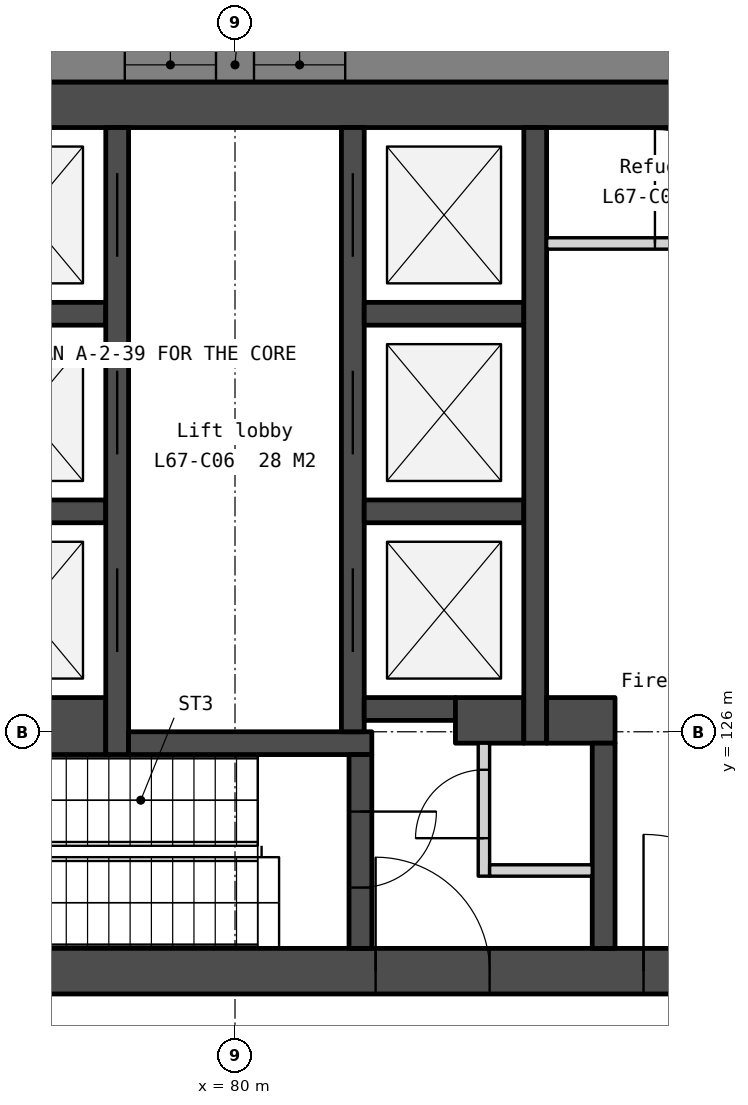
"""IFC4 building model, lengths in metres.
Left out: names, types, materials, properties, quantities, classifications, styles, units other than length and angle.
Written with IfcOpenShell. Run it as: python <this file> out.ifc"""

import sys

from ifc_helpers import new_model, si_unit, direction, frame, frame_2d, origin, place, context, subcontext, project, spatial, polyline, rectangle, outline, extrude, element, fill, save


model = new_model("IFC4")
c1 = context("Model", 3, precision=1e-05, world=origin(), true_north=direction((0.0, 1.0)))
c2 = subcontext(c1, "Body", "Model", "MODEL_VIEW")
j1 = project(units=[si_unit("LENGTHUNIT", "METRE"), si_unit("PLANEANGLEUNIT", "RADIAN")], contexts=[c1])
p1 = place(None, origin())
s1 = spatial("IfcSite", under=j1, at=p1, CompositionType="ELEMENT")
p2 = place(p1, origin())
s2 = spatial("IfcBuilding", under=s1, at=p2, CompositionType="ELEMENT")
p3 = place(p2, frame((0.0, 0.0, 273.8)))
s3 = spatial("IfcBuildingStorey", under=s2, at=p3, CompositionType="ELEMENT", Elevation=273.8)
p4 = place(p3, frame((69.0, 134.25, 0.0), z_axis=(0.0, 0.0, 1.0), x_axis=(1.0, 0.0, 0.0)))
e1 = element("IfcWall", 1, at=p4, inside=s3, PredefinedType="SOLIDWALL", context=c2, shape_type="SweptSolid", body=[
    extrude(rectangle(XDim=22.0, YDim=0.6, at=frame_2d((11.0, 0.0))), origin(), (0.0, 0.0, 1.0), 3.75),
])
p5 = place(p3, frame((69.0, 122.85, 0.0), z_axis=(0.0, 0.0, 1.0), x_axis=(1.0, 0.0, 0.0)))
e2 = element("IfcWall", 2, at=p5, inside=s3, PredefinedType="SOLIDWALL", context=c2, shape_type="SweptSolid", body=[
    extrude(rectangle(XDim=22.0, YDim=0.6, at=frame_2d((11.0, 0.0))), origin(), (0.0, 0.0, 1.0), 3.75),
])
p6 = place(p5, frame((16.375, 0.0, 0.0)))
e3 = element("IfcOpeningElement", 3, at=p6, cuts=e2, PredefinedType="OPENING", context=c2, shape_type="SweptSolid", body=[
    extrude(rectangle(XDim=1.8, YDim=2.1, at=frame_2d((0.9, 1.05))), frame((0.0, 0.31, 0.0), z_axis=(0.0, -1.0, 0.0), x_axis=(1.0, 0.0, 0.0)), (0.0, 0.0, 1.0), 0.62),
])
p7 = place(p5, frame((3.825, 0.0, 0.0)))
e4 = element("IfcOpeningElement", 4, at=p7, cuts=e2, PredefinedType="OPENING", context=c2, shape_type="SweptSolid", body=[
    extrude(rectangle(XDim=1.8, YDim=2.1, at=frame_2d((0.9, 1.05))), frame((0.0, 0.31, 0.0), z_axis=(0.0, -1.0, 0.0), x_axis=(1.0, 0.0, 0.0)), (0.0, 0.0, 1.0), 0.62),
])
p8 = place(p5, frame((12.85, 0.0, 0.0)))
e5 = element("IfcOpeningElement", 5, at=p8, cuts=e2, PredefinedType="OPENING", context=c2, shape_type="SweptSolid", body=[
    extrude(rectangle(XDim=1.5, YDim=2.1, at=frame_2d((0.75, 1.05))), frame((0.0, 0.31, 0.0), z_axis=(0.0, -1.0, 0.0), x_axis=(1.0, 0.0, 0.0)), (0.0, 0.0, 1.0), 0.62),
])
for number, where, z_axis, x_axis in (
    (6, (76.2, 131.5, 0.0), (0.0, 0.0, 1.0), (1.0, 0.0, 0.0)),
    (7, (76.2, 128.9, 0.0), (0.0, 0.0, 1.0), (1.0, 0.0, 0.0)),
):
    element("IfcWall", number, at=place(p3, frame(where, z_axis=z_axis, x_axis=x_axis)), inside=s3, PredefinedType="SOLIDWALL", context=c2, shape_type="SweptSolid", body=[
        extrude(rectangle(XDim=2.1, YDim=0.3, at=frame_2d((1.05, 0.0))), origin(), (0.0, 0.0, 1.0), 3.75),
    ])
p9 = place(p3, frame((76.2, 126.075, 0.0), z_axis=(0.0, 0.0, 1.0), x_axis=(1.0, 0.0, 0.0)))
e8 = element("IfcWall", 8, at=p9, inside=s3, PredefinedType="SOLIDWALL", context=c2, shape_type="SweptSolid", body=[
    extrude(rectangle(XDim=2.1, YDim=0.75, at=frame_2d((1.05, 0.0))), origin(), (0.0, 0.0, 1.0), 3.75),
])
p10 = place(p3, frame((78.45, 133.95, 0.0), z_axis=(0.0, 0.0, 1.0), x_axis=(0.0, -1.0, 0.0)))
e9 = element("IfcWall", 9, at=p10, inside=s3, PredefinedType="SOLIDWALL", context=c2, shape_type="SweptSolid", body=[
    extrude(rectangle(XDim=8.25, YDim=0.3, at=frame_2d((4.125, 0.0))), origin(), (0.0, 0.0, 1.0), 3.75),
])
p11 = place(p10, frame((0.6, 0.0, 0.0)))
e10 = element("IfcOpeningElement", 10, at=p11, cuts=e9, PredefinedType="OPENING", context=c2, shape_type="SweptSolid", body=[
    extrude(rectangle(XDim=1.1, YDim=2.1, at=frame_2d((0.55, 1.05))), frame((0.0, 0.16, 0.0), z_axis=(0.0, -1.0, 0.0), x_axis=(1.0, 0.0, 0.0)), (0.0, 0.0, 1.0), 0.32),
])
p12 = place(p10, frame((3.2, 0.0, 0.0)))
e11 = element("IfcOpeningElement", 11, at=p12, cuts=e9, PredefinedType="OPENING", context=c2, shape_type="SweptSolid", body=[
    extrude(rectangle(XDim=1.1, YDim=2.1, at=frame_2d((0.55, 1.05))), frame((0.0, 0.16, 0.0), z_axis=(0.0, -1.0, 0.0), x_axis=(1.0, 0.0, 0.0)), (0.0, 0.0, 1.0), 0.32),
])
p13 = place(p10, frame((5.8, 0.0, 0.0)))
e12 = element("IfcOpeningElement", 12, at=p13, cuts=e9, PredefinedType="OPENING", context=c2, shape_type="SweptSolid", body=[
    extrude(rectangle(XDim=1.1, YDim=2.1, at=frame_2d((0.55, 1.05))), frame((0.0, 0.16, 0.0), z_axis=(0.0, -1.0, 0.0), x_axis=(1.0, 0.0, 0.0)), (0.0, 0.0, 1.0), 0.32),
])
p14 = place(p3, frame((78.6, 125.85, 0.0), z_axis=(0.0, 0.0, 1.0), x_axis=(1.0, 0.0, 0.0)))
e13 = element("IfcWall", 13, at=p14, inside=s3, PredefinedType="SOLIDWALL", context=c2, shape_type="SweptSolid", body=[
    extrude(rectangle(XDim=3.2, YDim=0.3, at=frame_2d((1.6, 0.0))), origin(), (0.0, 0.0, 1.0), 3.75),
])
p15 = place(p3, frame((81.55, 133.95, 0.0), z_axis=(0.0, 0.0, 1.0), x_axis=(0.0, -1.0, 0.0)))
e14 = element("IfcWall", 14, at=p15, inside=s3, PredefinedType="SOLIDWALL", context=c2, shape_type="SweptSolid", body=[
    extrude(rectangle(XDim=7.95, YDim=0.3, at=frame_2d((3.975, 0.0))), origin(), (0.0, 0.0, 1.0), 3.75),
])
p16 = place(p15, frame((0.6, 0.0, 0.0)))
e15 = element("IfcOpeningElement", 15, at=p16, cuts=e14, PredefinedType="OPENING", context=c2, shape_type="SweptSolid", body=[
    extrude(rectangle(XDim=1.1, YDim=2.1, at=frame_2d((0.55, 1.05))), frame((0.0, 0.16, 0.0), z_axis=(0.0, -1.0, 0.0), x_axis=(1.0, 0.0, 0.0)), (0.0, 0.0, 1.0), 0.32),
])
p17 = place(p15, frame((3.2, 0.0, 0.0)))
e16 = element("IfcOpeningElement", 16, at=p17, cuts=e14, PredefinedType="OPENING", context=c2, shape_type="SweptSolid", body=[
    extrude(rectangle(XDim=1.1, YDim=2.1, at=frame_2d((0.55, 1.05))), frame((0.0, 0.16, 0.0), z_axis=(0.0, -1.0, 0.0), x_axis=(1.0, 0.0, 0.0)), (0.0, 0.0, 1.0), 0.32),
])
p18 = place(p15, frame((5.8, 0.0, 0.0)))
e17 = element("IfcOpeningElement", 17, at=p18, cuts=e14, PredefinedType="OPENING", context=c2, shape_type="SweptSolid", body=[
    extrude(rectangle(XDim=1.1, YDim=2.1, at=frame_2d((0.55, 1.05))), frame((0.0, 0.16, 0.0), z_axis=(0.0, -1.0, 0.0), x_axis=(1.0, 0.0, 0.0)), (0.0, 0.0, 1.0), 0.32),
])
p19 = place(p3, frame((81.65, 125.7, 0.0), z_axis=(0.0, 0.0, 1.0), x_axis=(0.0, -1.0, 0.0)))
e18 = element("IfcWall", 18, at=p19, inside=s3, PredefinedType="SOLIDWALL", context=c2, shape_type="SweptSolid", body=[
    extrude(rectangle(XDim=2.55, YDim=0.3, at=frame_2d((1.275, 0.0))), origin(), (0.0, 0.0, 1.0), 3.75),
])
p20 = place(p19, frame((0.75, 0.0, 0.0)))
e19 = element("IfcOpeningElement", 19, at=p20, cuts=e18, PredefinedType="OPENING", context=c2, shape_type="SweptSolid", body=[
    extrude(rectangle(XDim=1.0, YDim=2.1, at=frame_2d((0.5, 1.05))), frame((0.0, 0.16, 0.0), z_axis=(0.0, -1.0, 0.0), x_axis=(1.0, 0.0, 0.0)), (0.0, 0.0, 1.0), 0.32),
])
for number, where, z_axis, x_axis in (
    (20, (81.7, 131.5, 0.0), (0.0, 0.0, 1.0), (1.0, 0.0, 0.0)),
    (21, (81.7, 128.9, 0.0), (0.0, 0.0, 1.0), (1.0, 0.0, 0.0)),
):
    element("IfcWall", number, at=place(p3, frame(where, z_axis=z_axis, x_axis=x_axis)), inside=s3, PredefinedType="SOLIDWALL", context=c2, shape_type="SweptSolid", body=[
        extrude(rectangle(XDim=2.1, YDim=0.3, at=frame_2d((1.05, 0.0))), origin(), (0.0, 0.0, 1.0), 3.75),
    ])
p21 = place(p3, frame((81.7, 126.3, 0.0), z_axis=(0.0, 0.0, 1.0), x_axis=(1.0, 0.0, 0.0)))
e22 = element("IfcWall", 22, at=p21, inside=s3, PredefinedType="SOLIDWALL", context=c2, shape_type="SweptSolid", body=[
    extrude(rectangle(XDim=1.2, YDim=0.3, at=frame_2d((0.6, 0.0))), origin(), (0.0, 0.0, 1.0), 3.75),
])
p22 = place(p3, frame((82.9, 126.15, 0.0), z_axis=(0.0, 0.0, 1.0), x_axis=(1.0, 0.0, 0.0)))
e23 = element("IfcWall", 23, at=p22, inside=s3, PredefinedType="SOLIDWALL", context=c2, shape_type="SweptSolid", body=[
    extrude(rectangle(XDim=0.9, YDim=0.6, at=frame_2d((0.45, 0.0))), origin(), (0.0, 0.0, 1.0), 3.75),
])
p23 = place(p3, frame((83.275, 125.85, 0.0), z_axis=(0.0, 0.0, 1.0), x_axis=(0.0, -1.0, 0.0)))
e24 = element("IfcWall", 24, at=p23, inside=s3, PredefinedType="PARTITIONING", context=c2, shape_type="SweptSolid", body=[
    extrude(rectangle(XDim=1.75, YDim=0.15, at=frame_2d((0.875, 0.0))), origin(), (0.0, 0.0, 1.0), 3.75),
])
p24 = place(p23, frame((0.35, 0.0, 0.0)))
e25 = element("IfcOpeningElement", 25, at=p24, cuts=e24, PredefinedType="OPENING", context=c2, shape_type="SweptSolid", body=[
    extrude(rectangle(XDim=0.9, YDim=2.1, at=frame_2d((0.45, 1.05))), frame((0.0, 0.085, 0.0), z_axis=(0.0, -1.0, 0.0), x_axis=(1.0, 0.0, 0.0)), (0.0, 0.0, 1.0), 0.17),
])
p25 = place(p3, frame((83.35, 124.175, 0.0), z_axis=(0.0, 0.0, 1.0), x_axis=(1.0, 0.0, 0.0)))
e26 = element("IfcWall", 26, at=p25, inside=s3, PredefinedType="PARTITIONING", context=c2, shape_type="SweptSolid", body=[
    extrude(rectangle(XDim=1.35, YDim=0.15, at=frame_2d((0.675, 0.0))), origin(), (0.0, 0.0, 1.0), 3.75),
])
p26 = place(p3, frame((83.95, 133.95, 0.0), z_axis=(0.0, 0.0, 1.0), x_axis=(0.0, -1.0, 0.0)))
e27 = element("IfcWall", 27, at=p26, inside=s3, PredefinedType="SOLIDWALL", context=c2, shape_type="SweptSolid", body=[
    extrude(rectangle(XDim=8.1, YDim=0.3, at=frame_2d((4.05, 0.0))), origin(), (0.0, 0.0, 1.0), 3.75),
])
p27 = place(p3, frame((84.1, 132.425, 0.0), z_axis=(0.0, 0.0, 1.0), x_axis=(1.0, 0.0, 0.0)))
e28 = element("IfcWall", 28, at=p27, inside=s3, PredefinedType="PARTITIONING", context=c2, shape_type="SweptSolid", body=[
    extrude(rectangle(XDim=3.45, YDim=0.15, at=frame_2d((1.725, 0.0))), origin(), (0.0, 0.0, 1.0), 3.75),
])
p28 = place(p27, frame((1.425, 0.0, 0.0)))
e29 = element("IfcOpeningElement", 29, at=p28, cuts=e28, PredefinedType="OPENING", context=c2, shape_type="SweptSolid", body=[
    extrude(rectangle(XDim=1.5, YDim=2.1, at=frame_2d((0.75, 1.05))), frame((0.0, 0.085, 0.0), z_axis=(0.0, -1.0, 0.0), x_axis=(1.0, 0.0, 0.0)), (0.0, 0.0, 1.0), 0.17),
])
p29 = place(p3, frame((84.1, 126.15, 0.0), z_axis=(0.0, 0.0, 1.0), x_axis=(1.0, 0.0, 0.0)))
e30 = element("IfcWall", 30, at=p29, inside=s3, PredefinedType="SOLIDWALL", context=c2, shape_type="SweptSolid", body=[
    extrude(rectangle(XDim=0.9, YDim=0.6, at=frame_2d((0.45, 0.0))), origin(), (0.0, 0.0, 1.0), 3.75),
])
p30 = place(p3, frame((84.85, 125.85, 0.0), z_axis=(0.0, 0.0, 1.0), x_axis=(0.0, -1.0, 0.0)))
e31 = element("IfcWall", 31, at=p30, inside=s3, PredefinedType="SOLIDWALL", context=c2, shape_type="SweptSolid", body=[
    extrude(rectangle(XDim=2.7, YDim=0.3, at=frame_2d((1.35, 0.0))), origin(), (0.0, 0.0, 1.0), 3.75),
])
p31 = place(p3, frame((98.486, 134.775, -0.15), z_axis=(0.0, 0.0, 1.0), x_axis=(-1.0, 0.0, 0.0)))
e32 = element("IfcWall", 32, at=p31, inside=s3, PredefinedType="SOLIDWALL", context=c2, shape_type="SweptSolid", body=[
    extrude(outline(polyline([(36.972, 0.0), (36.972, 3.9), (0.0, 3.9), (0.0, 0.0), (36.972, 0.0)])), frame((0.0, 0.225, 0.0), z_axis=(0.0, -1.0, 0.0), x_axis=(1.0, 0.0, 0.0)), (0.0, 0.0, 1.0), 0.45),
])
p32 = place(p31, frame((0.715, 0.0, 0.95)))
e33 = element("IfcOpeningElement", 33, at=p32, cuts=e32, PredefinedType="OPENING", context=c2, shape_type="SweptSolid", body=[
    extrude(rectangle(XDim=1.2, YDim=2.2, at=frame_2d((0.6, 1.1))), frame((0.0, 0.235, 0.0), z_axis=(0.0, -1.0, 0.0), x_axis=(1.0, 0.0, 0.0)), (0.0, 0.0, 1.0), 0.47),
])
p33 = place(p31, frame((7.793, 0.0, 0.95)))
e34 = element("IfcOpeningElement", 34, at=p33, cuts=e32, PredefinedType="OPENING", context=c2, shape_type="SweptSolid", body=[
    extrude(rectangle(XDim=1.2, YDim=2.2, at=frame_2d((0.6, 1.1))), frame((0.0, 0.235, 0.0), z_axis=(0.0, -1.0, 0.0), x_axis=(1.0, 0.0, 0.0)), (0.0, 0.0, 1.0), 0.47),
])
p34 = place(p31, frame((9.493, 0.0, 0.95)))
e35 = element("IfcOpeningElement", 35, at=p34, cuts=e32, PredefinedType="OPENING", context=c2, shape_type="SweptSolid", body=[
    extrude(rectangle(XDim=1.2, YDim=2.2, at=frame_2d((0.6, 1.1))), frame((0.0, 0.235, 0.0), z_axis=(0.0, -1.0, 0.0), x_axis=(1.0, 0.0, 0.0)), (0.0, 0.0, 1.0), 0.47),
])
p35 = place(p31, frame((17.036, 0.0, 0.95)))
e36 = element("IfcOpeningElement", 36, at=p35, cuts=e32, PredefinedType="OPENING", context=c2, shape_type="SweptSolid", body=[
    extrude(rectangle(XDim=1.2, YDim=2.2, at=frame_2d((0.6, 1.1))), frame((0.0, 0.235, 0.0), z_axis=(0.0, -1.0, 0.0), x_axis=(1.0, 0.0, 0.0)), (0.0, 0.0, 1.0), 0.47),
])
p36 = place(p31, frame((18.736, 0.0, 0.95)))
e37 = element("IfcOpeningElement", 37, at=p36, cuts=e32, PredefinedType="OPENING", context=c2, shape_type="SweptSolid", body=[
    extrude(rectangle(XDim=1.2, YDim=2.2, at=frame_2d((0.6, 1.1))), frame((0.0, 0.235, 0.0), z_axis=(0.0, -1.0, 0.0), x_axis=(1.0, 0.0, 0.0)), (0.0, 0.0, 1.0), 0.47),
])
p37 = place(p31, frame((26.279, 0.0, 0.95)))
e38 = element("IfcOpeningElement", 38, at=p37, cuts=e32, PredefinedType="OPENING", context=c2, shape_type="SweptSolid", body=[
    extrude(rectangle(XDim=1.2, YDim=2.2, at=frame_2d((0.6, 1.1))), frame((0.0, 0.235, 0.0), z_axis=(0.0, -1.0, 0.0), x_axis=(1.0, 0.0, 0.0)), (0.0, 0.0, 1.0), 0.47),
])
p38 = place(p31, frame((27.979, 0.0, 0.95)))
e39 = element("IfcOpeningElement", 39, at=p38, cuts=e32, PredefinedType="OPENING", context=c2, shape_type="SweptSolid", body=[
    extrude(rectangle(XDim=1.2, YDim=2.2, at=frame_2d((0.6, 1.1))), frame((0.0, 0.235, 0.0), z_axis=(0.0, -1.0, 0.0), x_axis=(1.0, 0.0, 0.0)), (0.0, 0.0, 1.0), 0.47),
])
p39 = place(p31, frame((35.058, 0.0, 0.95)))
e40 = element("IfcOpeningElement", 40, at=p39, cuts=e32, PredefinedType="OPENING", context=c2, shape_type="SweptSolid", body=[
    extrude(rectangle(XDim=1.2, YDim=2.2, at=frame_2d((0.6, 1.1))), frame((0.0, 0.235, 0.0), z_axis=(0.0, -1.0, 0.0), x_axis=(1.0, 0.0, 0.0)), (0.0, 0.0, 1.0), 0.47),
])
p40 = place(p3, frame((60.609, 133.207, -0.15), z_axis=(0.0, 0.0, 1.0), x_axis=(0.500002536638, -0.866023939251, 0.0)))
e41 = element("IfcWall", 41, at=p40, inside=s3, PredefinedType="SOLIDWALL", context=c2, shape_type="SweptSolid", body=[
    extrude(outline(polyline([(36.972, 0.0), (36.972, 3.9), (0.0, 3.9), (0.0, 0.0), (36.972, 0.0)])), frame((0.0, 0.225, 0.0), z_axis=(0.0, -1.0, 0.0), x_axis=(1.0, 0.0, 0.0)), (0.0, 0.0, 1.0), 0.45),
])
p41 = place(p40, frame((0.715, 0.0, 0.95)))
e42 = element("IfcOpeningElement", 42, at=p41, cuts=e41, PredefinedType="OPENING", context=c2, shape_type="SweptSolid", body=[
    extrude(rectangle(XDim=1.2, YDim=2.2, at=frame_2d((0.6, 1.1))), frame((0.0, 0.235, 0.0), z_axis=(0.0, -1.0, 0.0), x_axis=(1.0, 0.0, 0.0)), (0.0, 0.0, 1.0), 0.47),
])
p42 = place(p40, frame((7.793, 0.0, 0.95)))
e43 = element("IfcOpeningElement", 43, at=p42, cuts=e41, PredefinedType="OPENING", context=c2, shape_type="SweptSolid", body=[
    extrude(rectangle(XDim=1.2, YDim=2.2, at=frame_2d((0.6, 1.1))), frame((0.0, 0.235, 0.0), z_axis=(0.0, -1.0, 0.0), x_axis=(1.0, 0.0, 0.0)), (0.0, 0.0, 1.0), 0.47),
])
p43 = place(p40, frame((9.493, 0.0, 0.95)))
e44 = element("IfcOpeningElement", 44, at=p43, cuts=e41, PredefinedType="OPENING", context=c2, shape_type="SweptSolid", body=[
    extrude(rectangle(XDim=1.2, YDim=2.2, at=frame_2d((0.6, 1.1))), frame((0.0, 0.235, 0.0), z_axis=(0.0, -1.0, 0.0), x_axis=(1.0, 0.0, 0.0)), (0.0, 0.0, 1.0), 0.47),
])
p44 = place(p40, frame((17.036, 0.0, 0.95)))
e45 = element("IfcOpeningElement", 45, at=p44, cuts=e41, PredefinedType="OPENING", context=c2, shape_type="SweptSolid", body=[
    extrude(rectangle(XDim=1.2, YDim=2.2, at=frame_2d((0.6, 1.1))), frame((0.0, 0.235, 0.0), z_axis=(0.0, -1.0, 0.0), x_axis=(1.0, 0.0, 0.0)), (0.0, 0.0, 1.0), 0.47),
])
p45 = place(p40, frame((18.736, 0.0, 0.95)))
e46 = element("IfcOpeningElement", 46, at=p45, cuts=e41, PredefinedType="OPENING", context=c2, shape_type="SweptSolid", body=[
    extrude(rectangle(XDim=1.2, YDim=2.2, at=frame_2d((0.6, 1.1))), frame((0.0, 0.235, 0.0), z_axis=(0.0, -1.0, 0.0), x_axis=(1.0, 0.0, 0.0)), (0.0, 0.0, 1.0), 0.47),
])
p46 = place(p40, frame((26.279, 0.0, 0.95)))
e47 = element("IfcOpeningElement", 47, at=p46, cuts=e41, PredefinedType="OPENING", context=c2, shape_type="SweptSolid", body=[
    extrude(rectangle(XDim=1.2, YDim=2.2, at=frame_2d((0.6, 1.1))), frame((0.0, 0.235, 0.0), z_axis=(0.0, -1.0, 0.0), x_axis=(1.0, 0.0, 0.0)), (0.0, 0.0, 1.0), 0.47),
])
p47 = place(p40, frame((27.979, 0.0, 0.95)))
e48 = element("IfcOpeningElement", 48, at=p47, cuts=e41, PredefinedType="OPENING", context=c2, shape_type="SweptSolid", body=[
    extrude(rectangle(XDim=1.2, YDim=2.2, at=frame_2d((0.6, 1.1))), frame((0.0, 0.235, 0.0), z_axis=(0.0, -1.0, 0.0), x_axis=(1.0, 0.0, 0.0)), (0.0, 0.0, 1.0), 0.47),
])
p48 = place(p40, frame((35.058, 0.0, 0.95)))
e49 = element("IfcOpeningElement", 49, at=p48, cuts=e41, PredefinedType="OPENING", context=c2, shape_type="SweptSolid", body=[
    extrude(rectangle(XDim=1.2, YDim=2.2, at=frame_2d((0.6, 1.1))), frame((0.0, 0.235, 0.0), z_axis=(0.0, -1.0, 0.0), x_axis=(1.0, 0.0, 0.0)), (0.0, 0.0, 1.0), 0.47),
])
p49 = place(p11, origin())
e50 = element("IfcDoor", 50, at=p49, inside=s3, OperationType="SLIDING_TO_RIGHT", PredefinedType="DOOR", context=c2, shape_type="SweptSolid", body=[
    extrude(rectangle(XDim=1.1, YDim=2.1, at=frame_2d((0.55, 1.05))), frame((0.0, 0.025, 0.0), z_axis=(0.0, -1.0, 0.0), x_axis=(1.0, 0.0, 0.0)), (0.0, 0.0, 1.0), 0.05),
])
fill(e10, e50)
p50 = place(p12, origin())
e51 = element("IfcDoor", 51, at=p50, inside=s3, OperationType="SLIDING_TO_RIGHT", PredefinedType="DOOR", context=c2, shape_type="SweptSolid", body=[
    extrude(rectangle(XDim=1.1, YDim=2.1, at=frame_2d((0.55, 1.05))), frame((0.0, 0.025, 0.0), z_axis=(0.0, -1.0, 0.0), x_axis=(1.0, 0.0, 0.0)), (0.0, 0.0, 1.0), 0.05),
])
fill(e11, e51)
p51 = place(p13, origin())
e52 = element("IfcDoor", 52, at=p51, inside=s3, OperationType="SLIDING_TO_RIGHT", PredefinedType="DOOR", context=c2, shape_type="SweptSolid", body=[
    extrude(rectangle(XDim=1.1, YDim=2.1, at=frame_2d((0.55, 1.05))), frame((0.0, 0.025, 0.0), z_axis=(0.0, -1.0, 0.0), x_axis=(1.0, 0.0, 0.0)), (0.0, 0.0, 1.0), 0.05),
])
fill(e12, e52)
p52 = place(p16, origin())
e53 = element("IfcDoor", 53, at=p52, inside=s3, OperationType="SLIDING_TO_LEFT", PredefinedType="DOOR", context=c2, shape_type="SweptSolid", body=[
    extrude(rectangle(XDim=1.1, YDim=2.1, at=frame_2d((0.55, 1.05))), frame((0.0, 0.025, 0.0), z_axis=(0.0, -1.0, 0.0), x_axis=(1.0, 0.0, 0.0)), (0.0, 0.0, 1.0), 0.05),
])
fill(e15, e53)
p53 = place(p17, origin())
e54 = element("IfcDoor", 54, at=p53, inside=s3, OperationType="SLIDING_TO_LEFT", PredefinedType="DOOR", context=c2, shape_type="SweptSolid", body=[
    extrude(rectangle(XDim=1.1, YDim=2.1, at=frame_2d((0.55, 1.05))), frame((0.0, 0.025, 0.0), z_axis=(0.0, -1.0, 0.0), x_axis=(1.0, 0.0, 0.0)), (0.0, 0.0, 1.0), 0.05),
])
fill(e16, e54)
p54 = place(p18, origin())
e55 = element("IfcDoor", 55, at=p54, inside=s3, OperationType="SLIDING_TO_LEFT", PredefinedType="DOOR", context=c2, shape_type="SweptSolid", body=[
    extrude(rectangle(XDim=1.1, YDim=2.1, at=frame_2d((0.55, 1.05))), frame((0.0, 0.025, 0.0), z_axis=(0.0, -1.0, 0.0), x_axis=(1.0, 0.0, 0.0)), (0.0, 0.0, 1.0), 0.05),
])
fill(e17, e55)
p55 = place(p6, origin())
e56 = element("IfcDoor", 56, at=p55, inside=s3, OperationType="DOUBLE_DOOR_DOUBLE_SWING", PredefinedType="DOOR", context=c2, shape_type="SweptSolid", body=[
    extrude(rectangle(XDim=1.8, YDim=2.1, at=frame_2d((0.9, 1.05))), frame((0.0, 0.025, 0.0), z_axis=(0.0, -1.0, 0.0), x_axis=(1.0, 0.0, 0.0)), (0.0, 0.0, 1.0), 0.05),
])
fill(e3, e56)
p56 = place(p8, origin())
e57 = element("IfcDoor", 57, at=p56, inside=s3, OperationType="DOUBLE_DOOR_DOUBLE_SWING", PredefinedType="DOOR", context=c2, shape_type="SweptSolid", body=[
    extrude(rectangle(XDim=1.5, YDim=2.1, at=frame_2d((0.75, 1.05))), frame((0.0, 0.025, 0.0), z_axis=(0.0, -1.0, 0.0), x_axis=(1.0, 0.0, 0.0)), (0.0, 0.0, 1.0), 0.05),
])
fill(e5, e57)
p57 = place(p24, origin())
e58 = element("IfcDoor", 58, at=p57, inside=s3, OperationType="SINGLE_SWING_RIGHT", PredefinedType="DOOR", context=c2, shape_type="SweptSolid", body=[
    extrude(rectangle(XDim=0.9, YDim=2.1, at=frame_2d((0.45, 1.05))), frame((0.0, 0.025, 0.0), z_axis=(0.0, -1.0, 0.0), x_axis=(1.0, 0.0, 0.0)), (0.0, 0.0, 1.0), 0.05),
])
fill(e25, e58)
p58 = place(p28, origin())
e59 = element("IfcDoor", 59, at=p58, inside=s3, OperationType="DOUBLE_DOOR_DOUBLE_SWING", PredefinedType="DOOR", context=c2, shape_type="SweptSolid", body=[
    extrude(rectangle(XDim=1.5, YDim=2.1, at=frame_2d((0.75, 1.05))), frame((0.0, 0.025, 0.0), z_axis=(0.0, -1.0, 0.0), x_axis=(1.0, 0.0, 0.0)), (0.0, 0.0, 1.0), 0.05),
])
fill(e29, e59)
p59 = place(p20, origin())
e60 = element("IfcDoor", 60, at=p59, inside=s3, OperationType="SINGLE_SWING_LEFT", PredefinedType="DOOR", context=c2, shape_type="SweptSolid", body=[
    extrude(rectangle(XDim=1.0, YDim=2.1, at=frame_2d((0.5, 1.05))), frame((0.0, 0.025, 0.0), z_axis=(0.0, -1.0, 0.0), x_axis=(1.0, 0.0, 0.0)), (0.0, 0.0, 1.0), 0.05),
])
fill(e19, e60)
p60 = place(p35, origin())
e61 = element("IfcWindow", 61, at=p60, inside=s3, PartitioningType="SINGLE_PANEL", PredefinedType="WINDOW", context=c2, shape_type="SweptSolid", body=[
    extrude(rectangle(XDim=1.2, YDim=2.2, at=frame_2d((0.6, 1.1))), frame((0.0, 0.03, 0.0), z_axis=(0.0, -1.0, 0.0), x_axis=(1.0, 0.0, 0.0)), (0.0, 0.0, 1.0), 0.06),
])
fill(e36, e61)
p61 = place(p36, origin())
e62 = element("IfcWindow", 62, at=p61, inside=s3, PartitioningType="SINGLE_PANEL", PredefinedType="WINDOW", context=c2, shape_type="SweptSolid", body=[
    extrude(rectangle(XDim=1.2, YDim=2.2, at=frame_2d((0.6, 1.1))), frame((0.0, 0.03, 0.0), z_axis=(0.0, -1.0, 0.0), x_axis=(1.0, 0.0, 0.0)), (0.0, 0.0, 1.0), 0.06),
])
fill(e37, e62)
save(model, sys.argv[1])
